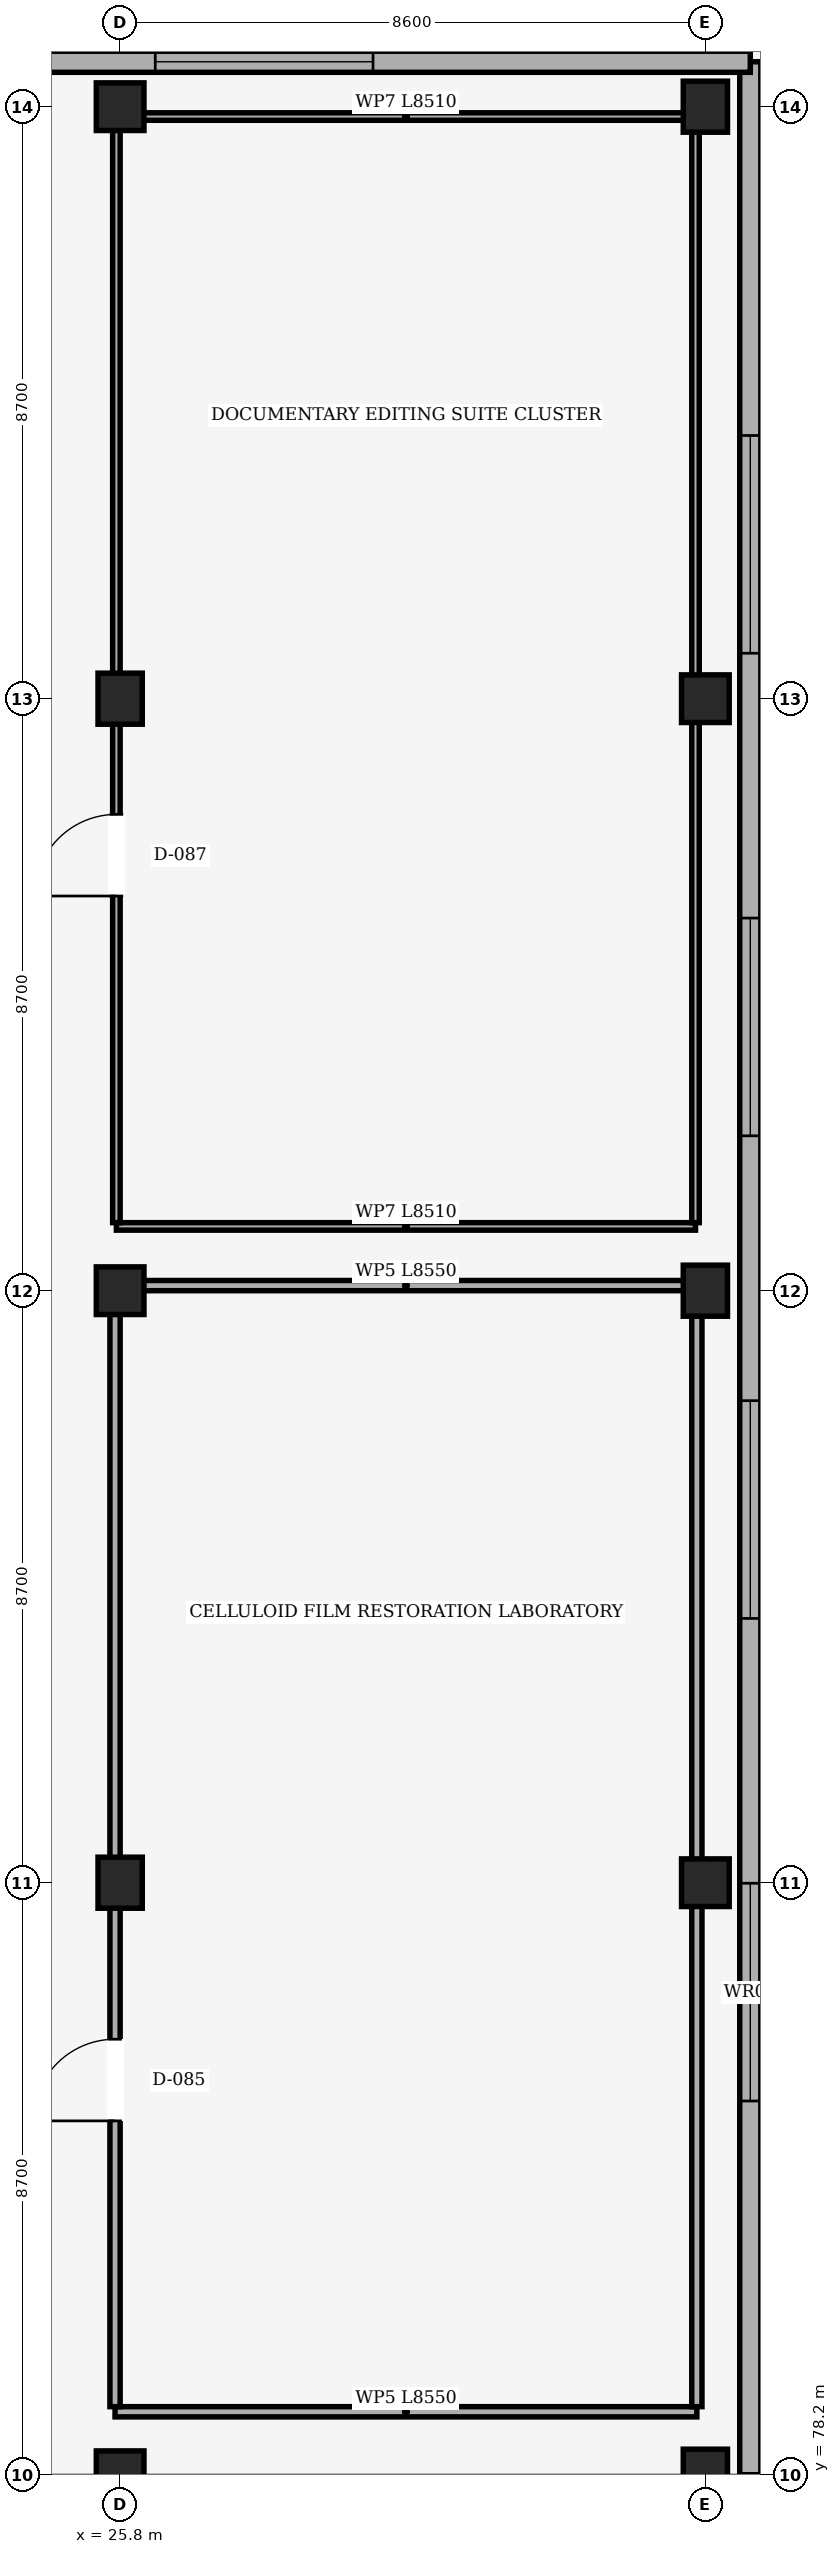
"""IFC4 building model, lengths in metres.
Left out: names, types, materials, properties, quantities, classifications, styles, units other than length and angle.
Written with IfcOpenShell. Run it as: python <this file> out.ifc"""

import sys

from ifc_helpers import new_model, si_unit, direction, frame, frame_2d, origin, origin_2d, place, context, subcontext, project, spatial, rectangle, extrude, element, fill, save


model = new_model("IFC4")
c1 = context("Model", 3, precision=1e-05, world=origin(), true_north=direction((0.0, 1.0)))
c2 = subcontext(c1, "Body", "Model", "MODEL_VIEW")
j1 = project(units=[si_unit("LENGTHUNIT", "METRE"), si_unit("PLANEANGLEUNIT", "RADIAN")], contexts=[c1])
p1 = place(None, origin())
s1 = spatial("IfcSite", under=j1, at=p1, CompositionType="ELEMENT")
p2 = place(p1, origin())
s2 = spatial("IfcBuilding", under=s1, at=p2, CompositionType="ELEMENT")
p3 = place(p2, frame((0.0, 0.0, 8.4)))
s3 = spatial("IfcBuildingStorey", under=s2, at=p3, CompositionType="ELEMENT", Elevation=8.4)
p4 = place(p3, frame((25.8, 78.2, 0.0), z_axis=(0.0, 0.0, 1.0), x_axis=(1.0, 0.0, 0.0)))
e1 = element("IfcColumn", 1, at=p4, inside=s3, PredefinedType="COLUMN", context=c2, shape_type="SweptSolid", body=[
    extrude(rectangle(XDim=0.7, YDim=0.7, at=origin_2d()), origin(), (0.0, 0.0, 1.0), 3.34),
])
p5 = place(p3, frame((25.8, 86.9, 0.0), z_axis=(0.0, 0.0, 1.0), x_axis=(1.0, 0.0, 0.0)))
e2 = element("IfcColumn", 2, at=p5, inside=s3, PredefinedType="COLUMN", context=c2, shape_type="SweptSolid", body=[
    extrude(rectangle(XDim=0.65, YDim=0.75, at=origin_2d()), origin(), (0.0, 0.0, 1.0), 3.34),
])
p6 = place(p3, frame((25.8, 95.6, 0.0), z_axis=(0.0, 0.0, 1.0), x_axis=(1.0, 0.0, 0.0)))
e3 = element("IfcColumn", 3, at=p6, inside=s3, PredefinedType="COLUMN", context=c2, shape_type="SweptSolid", body=[
    extrude(rectangle(XDim=0.7, YDim=0.7, at=origin_2d()), origin(), (0.0, 0.0, 1.0), 3.34),
])
p7 = place(p3, frame((25.8, 104.3, 0.0), z_axis=(0.0, 0.0, 1.0), x_axis=(1.0, 0.0, 0.0)))
e4 = element("IfcColumn", 4, at=p7, inside=s3, PredefinedType="COLUMN", context=c2, shape_type="SweptSolid", body=[
    extrude(rectangle(XDim=0.65, YDim=0.75, at=origin_2d()), origin(), (0.0, 0.0, 1.0), 3.34),
])
p8 = place(p3, frame((25.8, 113.0, 0.0), z_axis=(0.0, 0.0, 1.0), x_axis=(1.0, 0.0, 0.0)))
e5 = element("IfcColumn", 5, at=p8, inside=s3, PredefinedType="COLUMN", context=c2, shape_type="SweptSolid", body=[
    extrude(rectangle(XDim=0.7, YDim=0.7, at=origin_2d()), origin(), (0.0, 0.0, 1.0), 3.34),
])
p9 = place(p3, frame((34.4, 78.2, 0.0), z_axis=(0.0, 0.0, 1.0), x_axis=(1.0, 0.0, 0.0)))
e6 = element("IfcColumn", 6, at=p9, inside=s3, PredefinedType="COLUMN", context=c2, shape_type="SweptSolid", body=[
    extrude(rectangle(XDim=0.65, YDim=0.75, at=origin_2d()), origin(), (0.0, 0.0, 1.0), 3.34),
])
p10 = place(p3, frame((34.4, 86.9, 0.0), z_axis=(0.0, 0.0, 1.0), x_axis=(1.0, 0.0, 0.0)))
e7 = element("IfcColumn", 7, at=p10, inside=s3, PredefinedType="COLUMN", context=c2, shape_type="SweptSolid", body=[
    extrude(rectangle(XDim=0.7, YDim=0.7, at=origin_2d()), origin(), (0.0, 0.0, 1.0), 3.34),
])
p11 = place(p3, frame((34.4, 95.6, 0.0), z_axis=(0.0, 0.0, 1.0), x_axis=(1.0, 0.0, 0.0)))
e8 = element("IfcColumn", 8, at=p11, inside=s3, PredefinedType="COLUMN", context=c2, shape_type="SweptSolid", body=[
    extrude(rectangle(XDim=0.65, YDim=0.75, at=origin_2d()), origin(), (0.0, 0.0, 1.0), 3.34),
])
p12 = place(p3, frame((34.4, 104.3, 0.0), z_axis=(0.0, 0.0, 1.0), x_axis=(1.0, 0.0, 0.0)))
e9 = element("IfcColumn", 9, at=p12, inside=s3, PredefinedType="COLUMN", context=c2, shape_type="SweptSolid", body=[
    extrude(rectangle(XDim=0.7, YDim=0.7, at=origin_2d()), origin(), (0.0, 0.0, 1.0), 3.34),
])
p13 = place(p3, frame((34.4, 113.0, 0.0), z_axis=(0.0, 0.0, 1.0), x_axis=(1.0, 0.0, 0.0)))
e10 = element("IfcColumn", 10, at=p13, inside=s3, PredefinedType="COLUMN", context=c2, shape_type="SweptSolid", body=[
    extrude(rectangle(XDim=0.65, YDim=0.75, at=origin_2d()), origin(), (0.0, 0.0, 1.0), 3.34),
])
p14 = place(p3, frame((35.06, 78.2, 0.0), z_axis=(0.0, 0.0, 1.0), x_axis=(0.0, 1.0, 0.0)))
e11 = element("IfcWall", 11, at=p14, inside=s3, PredefinedType="SOLIDWALL", context=c2, shape_type="SweptSolid", body=[
    extrude(rectangle(XDim=35.46, YDim=0.31, at=frame_2d((17.73, 0.0))), origin(), (0.0, 0.0, 1.0), 3.34),
])
p15 = place(p14, frame((5.492, 0.0, 1.55)))
e12 = element("IfcOpeningElement", 12, at=p15, cuts=e11, PredefinedType="OPENING", context=c2, shape_type="SweptSolid", body=[
    extrude(rectangle(XDim=3.2, YDim=0.7, at=frame_2d((1.6, 0.35))), frame((0.0, 0.155, 0.0), z_axis=(0.0, -1.0, 0.0), x_axis=(1.0, 0.0, 0.0)), (0.0, 0.0, 1.0), 0.31),
])
p16 = place(p14, frame((12.584, 0.0, 1.55)))
e13 = element("IfcOpeningElement", 13, at=p16, cuts=e11, PredefinedType="OPENING", context=c2, shape_type="SweptSolid", body=[
    extrude(rectangle(XDim=3.2, YDim=0.7, at=frame_2d((1.6, 0.35))), frame((0.0, 0.155, 0.0), z_axis=(0.0, -1.0, 0.0), x_axis=(1.0, 0.0, 0.0)), (0.0, 0.0, 1.0), 0.31),
])
p17 = place(p14, frame((19.676, 0.0, 1.55)))
e14 = element("IfcOpeningElement", 14, at=p17, cuts=e11, PredefinedType="OPENING", context=c2, shape_type="SweptSolid", body=[
    extrude(rectangle(XDim=3.2, YDim=0.7, at=frame_2d((1.6, 0.35))), frame((0.0, 0.155, 0.0), z_axis=(0.0, -1.0, 0.0), x_axis=(1.0, 0.0, 0.0)), (0.0, 0.0, 1.0), 0.31),
])
p18 = place(p14, frame((26.768, 0.0, 1.55)))
e15 = element("IfcOpeningElement", 15, at=p18, cuts=e11, PredefinedType="OPENING", context=c2, shape_type="SweptSolid", body=[
    extrude(rectangle(XDim=3.2, YDim=0.7, at=frame_2d((1.6, 0.35))), frame((0.0, 0.155, 0.0), z_axis=(0.0, -1.0, 0.0), x_axis=(1.0, 0.0, 0.0)), (0.0, 0.0, 1.0), 0.31),
])
p19 = place(p3, frame((-0.66, 113.66, 0.0), z_axis=(0.0, 0.0, 1.0), x_axis=(1.0, 0.0, 0.0)))
e16 = element("IfcWall", 16, at=p19, inside=s3, PredefinedType="SOLIDWALL", context=c2, shape_type="SweptSolid", body=[
    extrude(rectangle(XDim=35.72, YDim=0.31, at=frame_2d((17.86, 0.0))), origin(), (0.0, 0.0, 1.0), 3.34),
])
p20 = place(p19, frame((5.544, 0.0, 1.55)))
e17 = element("IfcOpeningElement", 17, at=p20, cuts=e16, PredefinedType="OPENING", context=c2, shape_type="SweptSolid", body=[
    extrude(rectangle(XDim=3.2, YDim=0.7, at=frame_2d((1.6, 0.35))), frame((0.0, 0.155, 0.0), z_axis=(0.0, -1.0, 0.0), x_axis=(1.0, 0.0, 0.0)), (0.0, 0.0, 1.0), 0.31),
])
p21 = place(p19, frame((12.688, 0.0, 1.55)))
e18 = element("IfcOpeningElement", 18, at=p21, cuts=e16, PredefinedType="OPENING", context=c2, shape_type="SweptSolid", body=[
    extrude(rectangle(XDim=3.2, YDim=0.7, at=frame_2d((1.6, 0.35))), frame((0.0, 0.155, 0.0), z_axis=(0.0, -1.0, 0.0), x_axis=(1.0, 0.0, 0.0)), (0.0, 0.0, 1.0), 0.31),
])
p22 = place(p19, frame((19.832, 0.0, 1.55)))
e19 = element("IfcOpeningElement", 19, at=p22, cuts=e16, PredefinedType="OPENING", context=c2, shape_type="SweptSolid", body=[
    extrude(rectangle(XDim=3.2, YDim=0.7, at=frame_2d((1.6, 0.35))), frame((0.0, 0.155, 0.0), z_axis=(0.0, -1.0, 0.0), x_axis=(1.0, 0.0, 0.0)), (0.0, 0.0, 1.0), 0.31),
])
p23 = place(p19, frame((26.976, 0.0, 1.55)))
e20 = element("IfcOpeningElement", 20, at=p23, cuts=e16, PredefinedType="OPENING", context=c2, shape_type="SweptSolid", body=[
    extrude(rectangle(XDim=3.2, YDim=0.7, at=frame_2d((1.6, 0.35))), frame((0.0, 0.155, 0.0), z_axis=(0.0, -1.0, 0.0), x_axis=(1.0, 0.0, 0.0)), (0.0, 0.0, 1.0), 0.31),
])
p24 = place(p3, frame((34.275, 79.125, 0.0), z_axis=(0.0, 0.0, 1.0), x_axis=(-1.0, 0.0, 0.0)))
e21 = element("IfcWall", 21, at=p24, inside=s3, PredefinedType="PARTITIONING", context=c2, shape_type="SweptSolid", body=[
    extrude(rectangle(XDim=8.55, YDim=0.15, at=frame_2d((4.275, 0.0))), origin(), (0.0, 0.0, 1.0), 3.32),
])
p25 = place(p3, frame((25.725, 79.2, 0.0), z_axis=(0.0, 0.0, 1.0), x_axis=(0.0, 1.0, 0.0)))
e22 = element("IfcWall", 22, at=p25, inside=s3, PredefinedType="PARTITIONING", context=c2, shape_type="SweptSolid", body=[
    extrude(rectangle(XDim=16.4, YDim=0.15, at=frame_2d((8.2, 0.0))), origin(), (0.0, 0.0, 1.0), 2.57),
])
p26 = place(p25, frame((4.2, 0.0, 0.0)))
e23 = element("IfcOpeningElement", 23, at=p26, cuts=e22, PredefinedType="OPENING", context=c2, shape_type="SweptSolid", body=[
    extrude(rectangle(XDim=1.2, YDim=2.15, at=frame_2d((0.6, 1.075))), frame((0.0, 0.075, 0.0), z_axis=(0.0, -1.0, 0.0), x_axis=(1.0, 0.0, 0.0)), (0.0, 0.0, 1.0), 0.15),
])
p27 = place(p3, frame((25.725, 95.675, 0.0), z_axis=(0.0, 0.0, 1.0), x_axis=(1.0, 0.0, 0.0)))
e24 = element("IfcWall", 24, at=p27, inside=s3, PredefinedType="PARTITIONING", context=c2, shape_type="SweptSolid", body=[
    extrude(rectangle(XDim=8.55, YDim=0.15, at=frame_2d((4.275, 0.0))), origin(), (0.0, 0.0, 1.0), 2.67),
])
p28 = place(p3, frame((34.275, 95.6, 0.0), z_axis=(0.0, 0.0, 1.0), x_axis=(0.0, -1.0, 0.0)))
e25 = element("IfcWall", 25, at=p28, inside=s3, PredefinedType="PARTITIONING", context=c2, shape_type="SweptSolid", body=[
    extrude(rectangle(XDim=16.4, YDim=0.15, at=frame_2d((8.2, 0.0))), origin(), (0.0, 0.0, 1.0), 2.62),
])
p29 = place(p3, frame((34.255, 96.545, 0.0), z_axis=(0.0, 0.0, 1.0), x_axis=(-1.0, 0.0, 0.0)))
e26 = element("IfcWall", 26, at=p29, inside=s3, PredefinedType="PARTITIONING", context=c2, shape_type="SweptSolid", body=[
    extrude(rectangle(XDim=8.51, YDim=0.11, at=frame_2d((4.255, 0.0))), origin(), (0.0, 0.0, 1.0), 3.32),
])
p30 = place(p3, frame((25.745, 96.6, 0.0), z_axis=(0.0, 0.0, 1.0), x_axis=(0.0, 1.0, 0.0)))
e27 = element("IfcWall", 27, at=p30, inside=s3, PredefinedType="PARTITIONING", context=c2, shape_type="SweptSolid", body=[
    extrude(rectangle(XDim=16.2, YDim=0.11, at=frame_2d((8.1, 0.0))), origin(), (0.0, 0.0, 1.0), 2.57),
])
p31 = place(p30, frame((4.8, 0.0, 0.0)))
e28 = element("IfcOpeningElement", 28, at=p31, cuts=e27, PredefinedType="OPENING", context=c2, shape_type="SweptSolid", body=[
    extrude(rectangle(XDim=1.2, YDim=2.15, at=frame_2d((0.6, 1.075))), frame((0.0, 0.055, 0.0), z_axis=(0.0, -1.0, 0.0), x_axis=(1.0, 0.0, 0.0)), (0.0, 0.0, 1.0), 0.11),
])
p32 = place(p3, frame((25.745, 112.855, 0.0), z_axis=(0.0, 0.0, 1.0), x_axis=(1.0, 0.0, 0.0)))
e29 = element("IfcWall", 29, at=p32, inside=s3, PredefinedType="PARTITIONING", context=c2, shape_type="SweptSolid", body=[
    extrude(rectangle(XDim=8.51, YDim=0.11, at=frame_2d((4.255, 0.0))), origin(), (0.0, 0.0, 1.0), 2.72),
])
p33 = place(p3, frame((34.255, 112.8, 0.0), z_axis=(0.0, 0.0, 1.0), x_axis=(0.0, -1.0, 0.0)))
e30 = element("IfcWall", 30, at=p33, inside=s3, PredefinedType="PARTITIONING", context=c2, shape_type="SweptSolid", body=[
    extrude(rectangle(XDim=16.2, YDim=0.11, at=frame_2d((8.1, 0.0))), origin(), (0.0, 0.0, 1.0), 2.57),
])
p34 = place(p15, origin())
e31 = element("IfcWindow", 31, at=p34, inside=s3, PartitioningType="SINGLE_PANEL", PredefinedType="WINDOW", context=c2, shape_type="SweptSolid", body=[
    extrude(rectangle(XDim=3.2, YDim=0.7, at=frame_2d((1.6, 0.35))), frame((0.0, -0.06, 0.0), z_axis=(0.0, -1.0, 0.0), x_axis=(1.0, 0.0, 0.0)), (0.0, 0.0, 1.0), 0.06),
])
fill(e12, e31)
p35 = place(p16, origin())
e32 = element("IfcWindow", 32, at=p35, inside=s3, PartitioningType="SINGLE_PANEL", PredefinedType="WINDOW", context=c2, shape_type="SweptSolid", body=[
    extrude(rectangle(XDim=3.2, YDim=0.7, at=frame_2d((1.6, 0.35))), frame((0.0, -0.06, 0.0), z_axis=(0.0, -1.0, 0.0), x_axis=(1.0, 0.0, 0.0)), (0.0, 0.0, 1.0), 0.06),
])
fill(e13, e32)
p36 = place(p17, origin())
e33 = element("IfcWindow", 33, at=p36, inside=s3, PartitioningType="SINGLE_PANEL", PredefinedType="WINDOW", context=c2, shape_type="SweptSolid", body=[
    extrude(rectangle(XDim=3.2, YDim=0.7, at=frame_2d((1.6, 0.35))), frame((0.0, -0.06, 0.0), z_axis=(0.0, -1.0, 0.0), x_axis=(1.0, 0.0, 0.0)), (0.0, 0.0, 1.0), 0.06),
])
fill(e14, e33)
p37 = place(p18, origin())
e34 = element("IfcWindow", 34, at=p37, inside=s3, PartitioningType="SINGLE_PANEL", PredefinedType="WINDOW", context=c2, shape_type="SweptSolid", body=[
    extrude(rectangle(XDim=3.2, YDim=0.7, at=frame_2d((1.6, 0.35))), frame((0.0, -0.06, 0.0), z_axis=(0.0, -1.0, 0.0), x_axis=(1.0, 0.0, 0.0)), (0.0, 0.0, 1.0), 0.06),
])
fill(e15, e34)
p38 = place(p23, origin())
e35 = element("IfcWindow", 35, at=p38, inside=s3, PartitioningType="SINGLE_PANEL", PredefinedType="WINDOW", context=c2, shape_type="SweptSolid", body=[
    extrude(rectangle(XDim=3.2, YDim=0.7, at=frame_2d((1.6, 0.35))), frame((0.0, -0.06, 0.0), z_axis=(0.0, -1.0, 0.0), x_axis=(1.0, 0.0, 0.0)), (0.0, 0.0, 1.0), 0.06),
])
fill(e20, e35)
p39 = place(p26, origin())
e36 = element("IfcDoor", 36, at=p39, inside=s3, OperationType="SINGLE_SWING_LEFT", PredefinedType="DOOR", context=c2, shape_type="SweptSolid", body=[
    extrude(rectangle(XDim=1.2, YDim=2.15, at=frame_2d((0.6, 1.075))), frame((0.0, 0.025, 0.0), z_axis=(0.0, -1.0, 0.0), x_axis=(1.0, 0.0, 0.0)), (0.0, 0.0, 1.0), 0.05),
])
fill(e23, e36)
p40 = place(p31, origin())
e37 = element("IfcDoor", 37, at=p40, inside=s3, OperationType="SINGLE_SWING_LEFT", PredefinedType="DOOR", context=c2, shape_type="SweptSolid", body=[
    extrude(rectangle(XDim=1.2, YDim=2.15, at=frame_2d((0.6, 1.075))), frame((0.0, 0.025, 0.0), z_axis=(0.0, -1.0, 0.0), x_axis=(1.0, 0.0, 0.0)), (0.0, 0.0, 1.0), 0.05),
])
fill(e28, e37)
save(model, sys.argv[1])
